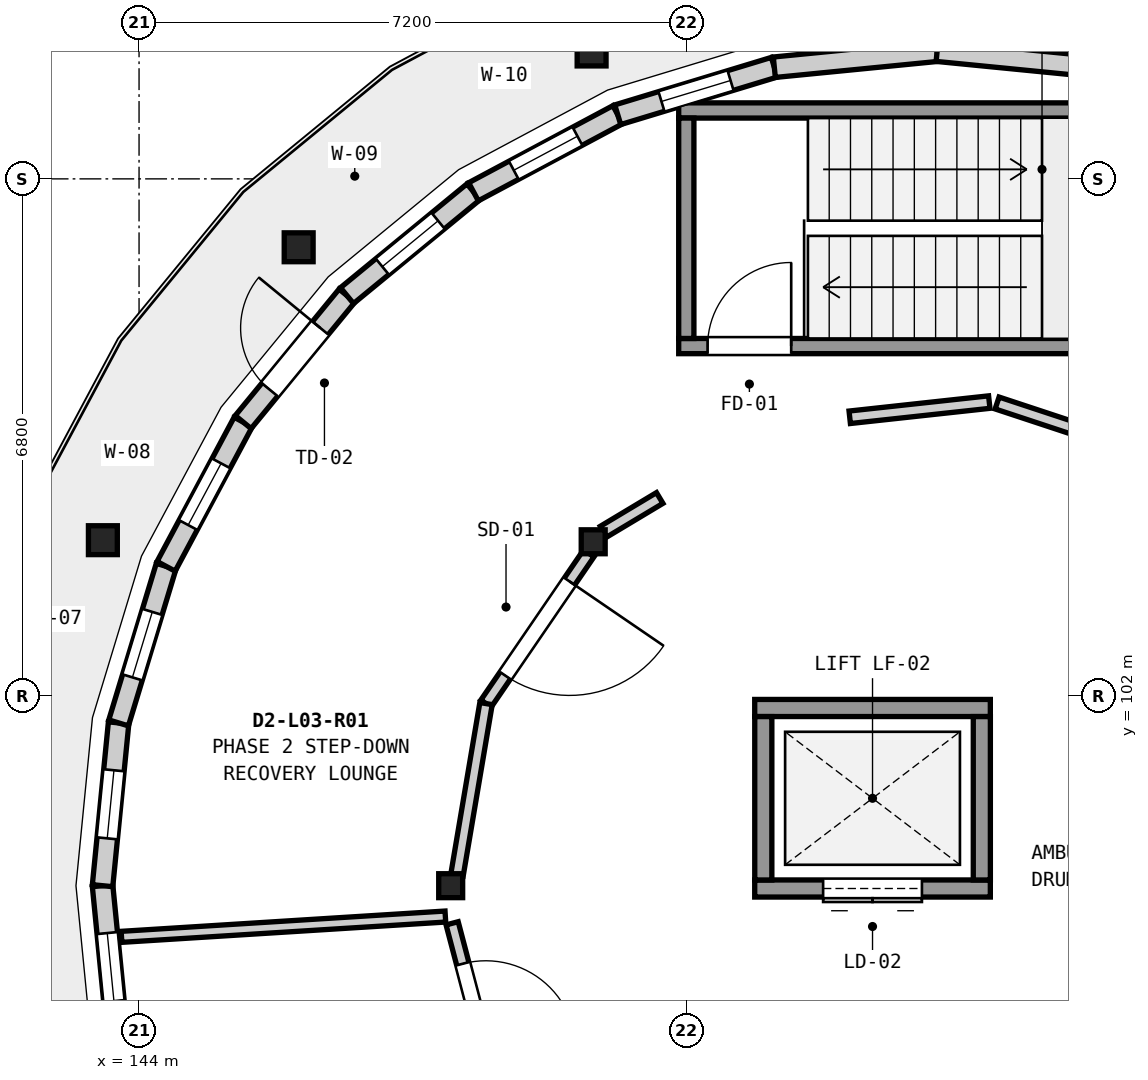
"""IFC4 building model, lengths in metres.
Left out: names, types, materials, properties, quantities, classifications, styles, units other than length and angle.
Written with IfcOpenShell. Run it as: python <this file> out.ifc"""

import sys

from ifc_helpers import new_model, si_unit, direction, frame, frame_2d, origin, origin_2d, place, context, subcontext, project, spatial, rectangle, circle, extrude, element, fill, save


model = new_model("IFC4")
c1 = context("Model", 3, precision=1e-05, world=origin(), true_north=direction((0.0, 1.0)))
c2 = subcontext(c1, "Body", "Model", "MODEL_VIEW")
j1 = project(units=[si_unit("LENGTHUNIT", "METRE"), si_unit("PLANEANGLEUNIT", "RADIAN")], contexts=[c1])
p1 = place(None, origin())
s1 = spatial("IfcSite", under=j1, at=p1, CompositionType="ELEMENT")
p2 = place(p1, origin())
s2 = spatial("IfcBuilding", under=s1, at=p2, CompositionType="ELEMENT")
p3 = place(p2, frame((0.0, 0.0, 12.95)))
s3 = spatial("IfcBuildingStorey", under=s2, at=p3, CompositionType="ELEMENT", Elevation=12.95)
for number, where, z_axis, x_axis in (
    (1, (149.954, 110.476, 0.0), (0.0, 0.0, 1.0), (1.0, 0.0, 0.0)),
    (2, (146.1, 107.9, 0.0), (0.0, 0.0, 1.0), (1.0, 0.0, 0.0)),
    (3, (143.524, 104.046, 0.0), (0.0, 0.0, 1.0), (1.0, 0.0, 0.0)),
):
    element("IfcColumn", number, at=place(p3, frame(where, z_axis=z_axis, x_axis=x_axis)), inside=s3, PredefinedType="PILASTER", context=c2, shape_type="SweptSolid", body=[
        extrude(circle(Radius=0.19, at=origin_2d()), origin(), (0.0, 0.0, 1.0), 4.2),
    ])
for number, where, z_axis, x_axis in (
    (4, (149.975, 104.025, 0.0), (0.0, 0.0, 1.0), (1.0, 0.0, 0.0)),
    (5, (148.1, 99.5, 0.0), (0.0, 0.0, 1.0), (1.0, 0.0, 0.0)),
):
    element("IfcColumn", number, at=place(p3, frame(where, z_axis=z_axis, x_axis=x_axis)), inside=s3, PredefinedType="COLUMN", context=c2, shape_type="SweptSolid", body=[
        extrude(rectangle(XDim=0.315, YDim=0.315, at=origin_2d()), origin(), (0.0, 0.0, 1.0), 4.2),
    ])
p4 = place(p3, frame((143.731, 97.358, 0.0), z_axis=(0.0, 0.0, 1.0), x_axis=(-0.097998765368, 0.995186536277, 0.0)))
e6 = element("IfcWall", 6, at=p4, inside=s3, PredefinedType="ELEMENTEDWALL", context=c2, shape_type="SweptSolid", body=[
    extrude(rectangle(XDim=2.152, YDim=0.27, at=frame_2d((1.076, 0.0))), origin(), (0.0, 0.0, 1.0), 3.314),
])
p5 = place(p4, frame((0.626, 0.0, 0.85)))
e7 = element("IfcOpeningElement", 7, at=p5, cuts=e6, PredefinedType="OPENING", context=c2, shape_type="SweptSolid", body=[
    extrude(rectangle(XDim=0.9, YDim=1.4, at=frame_2d((0.45, 0.7))), frame((0.0, 0.145, 0.0), z_axis=(0.0, -1.0, 0.0), x_axis=(1.0, 0.0, 0.0)), (0.0, 0.0, 1.0), 0.29),
])
p6 = place(p3, frame((143.52, 99.5, 0.0), z_axis=(0.0, 0.0, 1.0), x_axis=(0.097998765368, 0.995186536277, 0.0)))
e8 = element("IfcWall", 8, at=p6, inside=s3, PredefinedType="ELEMENTEDWALL", context=c2, shape_type="SweptSolid", body=[
    extrude(rectangle(XDim=2.152, YDim=0.27, at=frame_2d((1.076, 0.0))), origin(), (0.0, 0.0, 1.0), 3.314),
])
p7 = place(p6, frame((0.626, 0.0, 0.85)))
e9 = element("IfcOpeningElement", 9, at=p7, cuts=e8, PredefinedType="OPENING", context=c2, shape_type="SweptSolid", body=[
    extrude(rectangle(XDim=0.9, YDim=1.65, at=frame_2d((0.45, 0.825))), frame((0.0, 0.145, 0.0), z_axis=(0.0, -1.0, 0.0), x_axis=(1.0, 0.0, 0.0)), (0.0, 0.0, 1.0), 0.29),
])
p8 = place(p3, frame((143.731, 101.642, 0.0), z_axis=(0.0, 0.0, 1.0), x_axis=(0.290353644083, 0.95691941216, 0.0)))
e10 = element("IfcWall", 10, at=p8, inside=s3, PredefinedType="ELEMENTEDWALL", context=c2, shape_type="SweptSolid", body=[
    extrude(rectangle(XDim=2.153, YDim=0.27, at=frame_2d((1.076, 0.0))), origin(), (0.0, 0.0, 1.0), 3.314),
])
p9 = place(p8, frame((0.626, 0.0, 0.85)))
e11 = element("IfcOpeningElement", 11, at=p9, cuts=e10, PredefinedType="OPENING", context=c2, shape_type="SweptSolid", body=[
    extrude(rectangle(XDim=0.9, YDim=1.9, at=frame_2d((0.45, 0.95))), frame((0.0, 0.145, 0.0), z_axis=(0.0, -1.0, 0.0), x_axis=(1.0, 0.0, 0.0)), (0.0, 0.0, 1.0), 0.29),
])
p10 = place(p3, frame((144.356, 103.702, 0.0), z_axis=(0.0, 0.0, 1.0), x_axis=(0.471235784617, 0.882007276215, 0.0)))
e12 = element("IfcWall", 12, at=p10, inside=s3, PredefinedType="ELEMENTEDWALL", context=c2, shape_type="SweptSolid", body=[
    extrude(rectangle(XDim=2.152, YDim=0.27, at=frame_2d((1.076, 0.0))), origin(), (0.0, 0.0, 1.0), 3.314),
])
p11 = place(p10, frame((0.616, 0.0, 0.85)))
e13 = element("IfcOpeningElement", 13, at=p11, cuts=e12, PredefinedType="OPENING", context=c2, shape_type="SweptSolid", body=[
    extrude(rectangle(XDim=0.92, YDim=1.55, at=frame_2d((0.46, 0.775))), frame((0.0, 0.145, 0.0), z_axis=(0.0, -1.0, 0.0), x_axis=(1.0, 0.0, 0.0)), (0.0, 0.0, 1.0), 0.29),
])
p12 = place(p3, frame((145.37, 105.6, 0.0), z_axis=(0.0, 0.0, 1.0), x_axis=(0.634533827498, 0.772895091045, 0.0)))
e14 = element("IfcWall", 14, at=p12, inside=s3, PredefinedType="ELEMENTEDWALL", context=c2, shape_type="SweptSolid", body=[
    extrude(rectangle(XDim=2.153, YDim=0.27, at=frame_2d((1.076, 0.0))), origin(), (0.0, 0.0, 1.0), 3.314),
])
p13 = place(p12, frame((0.551, 0.0, 0.0)))
e15 = element("IfcOpeningElement", 15, at=p13, cuts=e14, PredefinedType="OPENING", context=c2, shape_type="SweptSolid", body=[
    extrude(rectangle(XDim=1.05, YDim=2.15, at=frame_2d((0.525, 1.075))), frame((0.0, 0.145, 0.0), z_axis=(0.0, -1.0, 0.0), x_axis=(1.0, 0.0, 0.0)), (0.0, 0.0, 1.0), 0.29),
])
p14 = place(p3, frame((146.736, 107.264, 0.0), z_axis=(0.0, 0.0, 1.0), x_axis=(0.772895091045, 0.634533827498, 0.0)))
e16 = element("IfcWall", 16, at=p14, inside=s3, PredefinedType="ELEMENTEDWALL", context=c2, shape_type="SweptSolid", body=[
    extrude(rectangle(XDim=2.153, YDim=0.27, at=frame_2d((1.076, 0.0))), origin(), (0.0, 0.0, 1.0), 3.314),
])
p15 = place(p14, frame((0.601, 0.0, 0.85)))
e17 = element("IfcOpeningElement", 17, at=p15, cuts=e16, PredefinedType="OPENING", context=c2, shape_type="SweptSolid", body=[
    extrude(rectangle(XDim=0.95, YDim=1.35, at=frame_2d((0.475, 0.675))), frame((0.0, 0.145, 0.0), z_axis=(0.0, -1.0, 0.0), x_axis=(1.0, 0.0, 0.0)), (0.0, 0.0, 1.0), 0.29),
])
p16 = place(p3, frame((148.4, 108.63, 0.0), z_axis=(0.0, 0.0, 1.0), x_axis=(0.882007276215, 0.471235784617, 0.0)))
e18 = element("IfcWall", 18, at=p16, inside=s3, PredefinedType="ELEMENTEDWALL", context=c2, shape_type="SweptSolid", body=[
    extrude(rectangle(XDim=2.152, YDim=0.27, at=frame_2d((1.076, 0.0))), origin(), (0.0, 0.0, 1.0), 3.314),
])
p17 = place(p16, frame((0.601, 0.0, 0.85)))
e19 = element("IfcOpeningElement", 19, at=p17, cuts=e18, PredefinedType="OPENING", context=c2, shape_type="SweptSolid", body=[
    extrude(rectangle(XDim=0.95, YDim=1.6, at=frame_2d((0.475, 0.8))), frame((0.0, 0.145, 0.0), z_axis=(0.0, -1.0, 0.0), x_axis=(1.0, 0.0, 0.0)), (0.0, 0.0, 1.0), 0.29),
])
p18 = place(p3, frame((150.298, 109.644, 0.0), z_axis=(0.0, 0.0, 1.0), x_axis=(0.95691941216, 0.290353644083, 0.0)))
e20 = element("IfcWall", 20, at=p18, inside=s3, PredefinedType="ELEMENTEDWALL", context=c2, shape_type="SweptSolid", body=[
    extrude(rectangle(XDim=2.153, YDim=0.27, at=frame_2d((1.076, 0.0))), origin(), (0.0, 0.0, 1.0), 3.314),
])
p19 = place(p18, frame((0.601, 0.0, 0.85)))
e21 = element("IfcOpeningElement", 21, at=p19, cuts=e20, PredefinedType="OPENING", context=c2, shape_type="SweptSolid", body=[
    extrude(rectangle(XDim=0.95, YDim=1.8, at=frame_2d((0.475, 0.9))), frame((0.0, 0.145, 0.0), z_axis=(0.0, -1.0, 0.0), x_axis=(1.0, 0.0, 0.0)), (0.0, 0.0, 1.0), 0.29),
])
for number, where, z_axis, x_axis in (
    (22, (152.358, 110.269, 0.0), (0.0, 0.0, 1.0), (0.995, 0.098, 0.0)),
    (23, (154.5, 110.48, 0.0), (0.0, 0.0, 1.0), (0.995, -0.098, 0.0)),
):
    element("IfcWall", number, at=place(p3, frame(where, z_axis=z_axis, x_axis=x_axis)), inside=s3, PredefinedType="ELEMENTEDWALL", context=c2, shape_type="SweptSolid", body=[
        extrude(rectangle(XDim=2.152, YDim=0.27, at=frame_2d((1.076, 0.0))), origin(), (0.0, 0.0, 1.0), 3.314),
    ])
p20 = place(p3, frame((151.1, 106.6, 0.0), z_axis=(0.0, 0.0, 1.0), x_axis=(1.0, 0.0, 0.0)))
e24 = element("IfcWall", 24, at=p20, inside=s3, PredefinedType="SHEAR", context=c2, shape_type="SweptSolid", body=[
    extrude(rectangle(XDim=6.8, YDim=0.2, at=frame_2d((3.4, 0.0))), origin(), (0.0, 0.0, 1.0), 3.96),
])
p21 = place(p20, frame((0.38, 0.0, 0.0)))
e25 = element("IfcOpeningElement", 25, at=p21, cuts=e24, PredefinedType="OPENING", context=c2, shape_type="SweptSolid", body=[
    extrude(rectangle(XDim=1.1, YDim=2.15, at=frame_2d((0.55, 1.075))), frame((0.0, 0.11, 0.0), z_axis=(0.0, -1.0, 0.0), x_axis=(1.0, 0.0, 0.0)), (0.0, 0.0, 1.0), 0.22),
])
p22 = place(p3, frame((151.1, 109.7, 0.0), z_axis=(0.0, 0.0, 1.0), x_axis=(1.0, 0.0, 0.0)))
e26 = element("IfcWall", 26, at=p22, inside=s3, PredefinedType="SHEAR", context=c2, shape_type="SweptSolid", body=[
    extrude(rectangle(XDim=6.8, YDim=0.2, at=frame_2d((3.4, 0.0))), origin(), (0.0, 0.0, 1.0), 3.96),
])
p23 = place(p3, frame((151.2, 106.7, 0.0), z_axis=(0.0, 0.0, 1.0), x_axis=(0.0, 1.0, 0.0)))
e27 = element("IfcWall", 27, at=p23, inside=s3, PredefinedType="SHEAR", context=c2, shape_type="SweptSolid", body=[
    extrude(rectangle(XDim=2.9, YDim=0.2, at=frame_2d((1.45, 0.0))), origin(), (0.0, 0.0, 1.0), 3.96),
])
p24 = place(p3, frame((152.1, 99.463, 0.0), z_axis=(0.0, 0.0, 1.0), x_axis=(1.0, 0.0, 0.0)))
e28 = element("IfcWall", 28, at=p24, inside=s3, PredefinedType="SHEAR", context=c2, shape_type="SweptSolid", body=[
    extrude(rectangle(XDim=3.1, YDim=0.225, at=frame_2d((1.55, 0.0))), origin(), (0.0, 0.0, 1.0), 3.96),
])
p25 = place(p24, frame((0.9, 0.0, 0.0)))
e29 = element("IfcOpeningElement", 29, at=p25, cuts=e28, PredefinedType="OPENING", context=c2, shape_type="SweptSolid", body=[
    extrude(rectangle(XDim=1.3, YDim=2.2, at=frame_2d((0.65, 1.1))), frame((0.0, 0.123, 0.0), z_axis=(0.0, -1.0, 0.0), x_axis=(1.0, 0.0, 0.0)), (0.0, 0.0, 1.0), 0.245),
])
p26 = place(p3, frame((152.1, 101.838, 0.0), z_axis=(0.0, 0.0, 1.0), x_axis=(1.0, 0.0, 0.0)))
e30 = element("IfcWall", 30, at=p26, inside=s3, PredefinedType="SHEAR", context=c2, shape_type="SweptSolid", body=[
    extrude(rectangle(XDim=3.1, YDim=0.225, at=frame_2d((1.55, 0.0))), origin(), (0.0, 0.0, 1.0), 3.96),
])
for number, where, z_axis, x_axis in (
    (31, (152.213, 99.575, 0.0), (0.0, 0.0, 1.0), (0.0, 1.0, 0.0)),
    (32, (155.088, 99.575, 0.0), (0.0, 0.0, 1.0), (0.0, 1.0, 0.0)),
):
    element("IfcWall", number, at=place(p3, frame(where, z_axis=z_axis, x_axis=x_axis)), inside=s3, PredefinedType="SHEAR", context=c2, shape_type="SweptSolid", body=[
        extrude(rectangle(XDim=2.15, YDim=0.225, at=frame_2d((1.075, 0.0))), origin(), (0.0, 0.0, 1.0), 3.96),
    ])
p27 = place(p3, frame((148.03, 99.094, 0.0), z_axis=(0.0, 0.0, 1.0), x_axis=(-0.998041214069, -0.062559851498, 0.0)))
e33 = element("IfcWall", 33, at=p27, inside=s3, PredefinedType="PARTITIONING", context=c2, shape_type="SweptSolid", body=[
    extrude(rectangle(XDim=4.269, YDim=0.145, at=frame_2d((2.135, 0.0))), origin(), (0.0, 0.0, 1.0), 3.279),
])
p28 = place(p3, frame((155.186, 105.863, 0.0), z_axis=(0.0, 0.0, 1.0), x_axis=(-0.994121595033, -0.108269359885, 0.0)))
e34 = element("IfcWall", 34, at=p28, inside=s3, PredefinedType="PARTITIONING", context=c2, shape_type="SweptSolid", body=[
    extrude(rectangle(XDim=1.847, YDim=0.165, at=frame_2d((0.923, 0.0))), origin(), (0.0, 0.0, 1.0), 3.279),
])
p29 = place(p3, frame((150.85, 104.601, 0.0), z_axis=(0.0, 0.0, 1.0), x_axis=(-0.857642888026, -0.514245735635, 0.0)))
e35 = element("IfcWall", 35, at=p29, inside=s3, PredefinedType="PARTITIONING", context=c2, shape_type="SweptSolid", body=[
    extrude(rectangle(XDim=0.862, YDim=0.165, at=frame_2d((0.431, 0.0))), origin(), (0.0, 0.0, 1.0), 3.279),
])
p30 = place(p3, frame((149.917, 103.873, 0.0), z_axis=(0.0, 0.0, 1.0), x_axis=(-0.564493885853, -0.825437249483, 0.0)))
e36 = element("IfcWall", 36, at=p30, inside=s3, PredefinedType="PARTITIONING", context=c2, shape_type="SweptSolid", body=[
    extrude(rectangle(XDim=2.395, YDim=0.165, at=frame_2d((1.198, 0.0))), origin(), (0.0, 0.0, 1.0), 3.279),
])
p31 = place(p30, frame((0.448, 0.0, 0.0)))
e37 = element("IfcOpeningElement", 37, at=p31, cuts=e36, PredefinedType="OPENING", context=c2, shape_type="SweptSolid", body=[
    extrude(rectangle(XDim=1.5, YDim=2.3, at=frame_2d((0.75, 1.15))), frame((0.0, 0.093, 0.0), z_axis=(0.0, -1.0, 0.0), x_axis=(1.0, 0.0, 0.0)), (0.0, 0.0, 1.0), 0.185),
])
p32 = place(p3, frame((148.565, 101.896, 0.0), z_axis=(0.0, 0.0, 1.0), x_axis=(-0.166872665665, -0.985978454863, 0.0)))
e38 = element("IfcWall", 38, at=p32, inside=s3, PredefinedType="PARTITIONING", context=c2, shape_type="SweptSolid", body=[
    extrude(rectangle(XDim=2.288, YDim=0.165, at=frame_2d((1.144, 0.0))), origin(), (0.0, 0.0, 1.0), 3.279),
])
p33 = place(p3, frame((148.119, 99.005, 0.0), z_axis=(0.0, 0.0, 1.0), x_axis=(0.254556263421, -0.96705796556, 0.0)))
e39 = element("IfcWall", 39, at=p33, inside=s3, PredefinedType="PARTITIONING", context=c2, shape_type="SweptSolid", body=[
    extrude(rectangle(XDim=2.29, YDim=0.165, at=frame_2d((1.145, 0.0))), origin(), (0.0, 0.0, 1.0), 3.279),
])
p34 = place(p33, frame((0.55, 0.0, 0.0)))
e40 = element("IfcOpeningElement", 40, at=p34, cuts=e39, PredefinedType="OPENING", context=c2, shape_type="SweptSolid", body=[
    extrude(rectangle(XDim=1.19, YDim=2.26, at=frame_2d((0.595, 1.13))), frame((0.0, 0.093, 0.0), z_axis=(0.0, -1.0, 0.0), x_axis=(1.0, 0.0, 0.0)), (0.0, 0.0, 1.0), 0.185),
])
p35 = place(p3, frame((157.652, 105.07, 0.0), z_axis=(0.0, 0.0, 1.0), x_axis=(-0.949484627373, 0.313813547161, 0.0)))
e41 = element("IfcWall", 41, at=p35, inside=s3, PredefinedType="PARTITIONING", context=c2, shape_type="SweptSolid", body=[
    extrude(rectangle(XDim=2.489, YDim=0.165, at=frame_2d((1.244, 0.0))), origin(), (0.0, 0.0, 1.0), 3.279),
])
p36 = place(p5, origin())
e42 = element("IfcWindow", 42, at=p36, inside=s3, PartitioningType="SINGLE_PANEL", PredefinedType="WINDOW", context=c2, shape_type="SweptSolid", body=[
    extrude(rectangle(XDim=0.9, YDim=1.4, at=frame_2d((0.45, 0.7))), frame((0.0, 0.03, 0.0), z_axis=(0.0, -1.0, 0.0), x_axis=(1.0, 0.0, 0.0)), (0.0, 0.0, 1.0), 0.06),
])
fill(e7, e42)
p37 = place(p7, origin())
e43 = element("IfcWindow", 43, at=p37, inside=s3, PartitioningType="SINGLE_PANEL", PredefinedType="WINDOW", context=c2, shape_type="SweptSolid", body=[
    extrude(rectangle(XDim=0.9, YDim=1.65, at=frame_2d((0.45, 0.825))), frame((0.0, 0.03, 0.0), z_axis=(0.0, -1.0, 0.0), x_axis=(1.0, 0.0, 0.0)), (0.0, 0.0, 1.0), 0.06),
])
fill(e9, e43)
p38 = place(p9, origin())
e44 = element("IfcWindow", 44, at=p38, inside=s3, PartitioningType="SINGLE_PANEL", PredefinedType="WINDOW", context=c2, shape_type="SweptSolid", body=[
    extrude(rectangle(XDim=0.9, YDim=1.9, at=frame_2d((0.45, 0.95))), frame((0.0, 0.03, 0.0), z_axis=(0.0, -1.0, 0.0), x_axis=(1.0, 0.0, 0.0)), (0.0, 0.0, 1.0), 0.06),
])
fill(e11, e44)
p39 = place(p11, origin())
e45 = element("IfcWindow", 45, at=p39, inside=s3, PartitioningType="SINGLE_PANEL", PredefinedType="WINDOW", context=c2, shape_type="SweptSolid", body=[
    extrude(rectangle(XDim=0.92, YDim=1.55, at=frame_2d((0.46, 0.775))), frame((0.0, 0.03, 0.0), z_axis=(0.0, -1.0, 0.0), x_axis=(1.0, 0.0, 0.0)), (0.0, 0.0, 1.0), 0.06),
])
fill(e13, e45)
p40 = place(p13, origin())
e46 = element("IfcDoor", 46, at=p40, inside=s3, OperationType="SINGLE_SWING_RIGHT", PredefinedType="DOOR", context=c2, shape_type="SweptSolid", body=[
    extrude(rectangle(XDim=1.05, YDim=2.15, at=frame_2d((0.525, 1.075))), frame((0.0, 0.025, 0.0), z_axis=(0.0, -1.0, 0.0), x_axis=(1.0, 0.0, 0.0)), (0.0, 0.0, 1.0), 0.05),
])
fill(e15, e46)
p41 = place(p15, origin())
e47 = element("IfcWindow", 47, at=p41, inside=s3, PartitioningType="SINGLE_PANEL", PredefinedType="WINDOW", context=c2, shape_type="SweptSolid", body=[
    extrude(rectangle(XDim=0.95, YDim=1.35, at=frame_2d((0.475, 0.675))), frame((0.0, 0.03, 0.0), z_axis=(0.0, -1.0, 0.0), x_axis=(1.0, 0.0, 0.0)), (0.0, 0.0, 1.0), 0.06),
])
fill(e17, e47)
p42 = place(p17, origin())
e48 = element("IfcWindow", 48, at=p42, inside=s3, PartitioningType="SINGLE_PANEL", PredefinedType="WINDOW", context=c2, shape_type="SweptSolid", body=[
    extrude(rectangle(XDim=0.95, YDim=1.6, at=frame_2d((0.475, 0.8))), frame((0.0, 0.03, 0.0), z_axis=(0.0, -1.0, 0.0), x_axis=(1.0, 0.0, 0.0)), (0.0, 0.0, 1.0), 0.06),
])
fill(e19, e48)
p43 = place(p19, origin())
e49 = element("IfcWindow", 49, at=p43, inside=s3, PartitioningType="SINGLE_PANEL", PredefinedType="WINDOW", context=c2, shape_type="SweptSolid", body=[
    extrude(rectangle(XDim=0.95, YDim=1.8, at=frame_2d((0.475, 0.9))), frame((0.0, 0.03, 0.0), z_axis=(0.0, -1.0, 0.0), x_axis=(1.0, 0.0, 0.0)), (0.0, 0.0, 1.0), 0.06),
])
fill(e21, e49)
p44 = place(p21, origin())
e50 = element("IfcDoor", 50, at=p44, inside=s3, OperationType="SINGLE_SWING_RIGHT", PredefinedType="DOOR", context=c2, shape_type="SweptSolid", body=[
    extrude(rectangle(XDim=1.1, YDim=2.15, at=frame_2d((0.55, 1.075))), frame((0.0, 0.025, 0.0), z_axis=(0.0, -1.0, 0.0), x_axis=(1.0, 0.0, 0.0)), (0.0, 0.0, 1.0), 0.05),
])
fill(e25, e50)
p45 = place(p25, origin())
e51 = element("IfcDoor", 51, at=p45, inside=s3, OperationType="DOUBLE_DOOR_SLIDING", PredefinedType="DOOR", context=c2, shape_type="SweptSolid", body=[
    extrude(rectangle(XDim=1.3, YDim=2.2, at=frame_2d((0.65, 1.1))), frame((0.0, 0.025, 0.0), z_axis=(0.0, -1.0, 0.0), x_axis=(1.0, 0.0, 0.0)), (0.0, 0.0, 1.0), 0.05),
])
fill(e29, e51)
p46 = place(p31, origin())
e52 = element("IfcDoor", 52, at=p46, inside=s3, OperationType="SINGLE_SWING_LEFT", PredefinedType="DOOR", context=c2, shape_type="SweptSolid", body=[
    extrude(rectangle(XDim=1.5, YDim=2.3, at=frame_2d((0.75, 1.15))), frame((0.0, 0.025, 0.0), z_axis=(0.0, -1.0, 0.0), x_axis=(1.0, 0.0, 0.0)), (0.0, 0.0, 1.0), 0.05),
])
fill(e37, e52)
p47 = place(p34, origin())
e53 = element("IfcDoor", 53, at=p47, inside=s3, OperationType="SINGLE_SWING_RIGHT", PredefinedType="DOOR", context=c2, shape_type="SweptSolid", body=[
    extrude(rectangle(XDim=1.19, YDim=2.26, at=frame_2d((0.595, 1.13))), frame((0.0, 0.025, 0.0), z_axis=(0.0, -1.0, 0.0), x_axis=(1.0, 0.0, 0.0)), (0.0, 0.0, 1.0), 0.05),
])
fill(e40, e53)
save(model, sys.argv[1])
